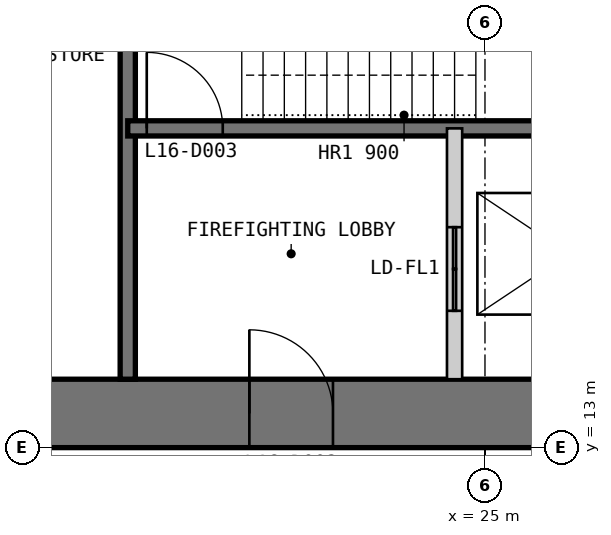
"""IFC4 building model, lengths in metres.
Left out: names, types, materials, properties, quantities, classifications, styles, units other than length and angle.
Written with IfcOpenShell. Run it as: python <this file> out.ifc"""

import sys

from ifc_helpers import new_model, si_unit, direction, frame, frame_2d, origin, place, context, subcontext, project, spatial, polyline, rectangle, outline, extrude, element, fill, save


model = new_model("IFC4")
c1 = context("Model", 3, precision=1e-05, world=origin(), true_north=direction((0.0, 1.0)))
c2 = subcontext(c1, "Body", "Model", "MODEL_VIEW")
j1 = project(units=[si_unit("LENGTHUNIT", "METRE"), si_unit("PLANEANGLEUNIT", "RADIAN")], contexts=[c1])
p1 = place(None, origin())
s1 = spatial("IfcSite", under=j1, at=p1, CompositionType="ELEMENT")
p2 = place(p1, origin())
s2 = spatial("IfcBuilding", under=s1, at=p2, CompositionType="ELEMENT")
p3 = place(p2, frame((0.0, 0.0, 71.0)))
s3 = spatial("IfcBuildingStorey", under=s2, at=p3, CompositionType="ELEMENT", Elevation=71.0)
p4 = place(p3, frame((13.0, 13.45, 0.0), z_axis=(0.0, 0.0, 1.0), x_axis=(1.0, 0.0, 0.0)))
e1 = element("IfcWall", 1, at=p4, inside=s3, PredefinedType="SHEAR", context=c2, shape_type="SweptSolid", body=[
    extrude(outline(polyline([(0.0, -0.45), (24.0, -0.45), (23.1, 0.45), (0.9, 0.45), (0.0, -0.45)])), origin(), (0.0, 0.0, 1.0), 4.0),
])
p5 = place(p4, frame((4.9, 0.0, 0.0)))
e2 = element("IfcOpeningElement", 2, at=p5, cuts=e1, PredefinedType="OPENING", context=c2, shape_type="SweptSolid", body=[
    extrude(rectangle(XDim=1.0, YDim=2.2, at=frame_2d((0.5, 1.1))), frame((0.0, 0.46, 0.0), z_axis=(0.0, -1.0, 0.0), x_axis=(1.0, 0.0, 0.0)), (0.0, 0.0, 1.0), 0.92),
])
p6 = place(p4, frame((8.9, 0.0, 0.0)))
e3 = element("IfcOpeningElement", 3, at=p6, cuts=e1, PredefinedType="OPENING", context=c2, shape_type="SweptSolid", body=[
    extrude(rectangle(XDim=1.1, YDim=2.2, at=frame_2d((0.55, 1.1))), frame((0.0, 0.46, 0.0), z_axis=(0.0, -1.0, 0.0), x_axis=(1.0, 0.0, 0.0)), (0.0, 0.0, 1.0), 0.92),
])
p7 = place(p4, frame((15.05, 0.0, 0.0)))
e4 = element("IfcOpeningElement", 4, at=p7, cuts=e1, PredefinedType="OPENING", context=c2, shape_type="SweptSolid", body=[
    extrude(rectangle(XDim=0.9, YDim=2.2, at=frame_2d((0.45, 1.1))), frame((0.0, 0.46, 0.0), z_axis=(0.0, -1.0, 0.0), x_axis=(1.0, 0.0, 0.0)), (0.0, 0.0, 1.0), 0.92),
])
p8 = place(p4, frame((17.9, 0.0, 0.0)))
e5 = element("IfcOpeningElement", 5, at=p8, cuts=e1, PredefinedType="OPENING", context=c2, shape_type="SweptSolid", body=[
    extrude(rectangle(XDim=1.0, YDim=2.2, at=frame_2d((0.5, 1.1))), frame((0.0, 0.46, 0.0), z_axis=(0.0, -1.0, 0.0), x_axis=(1.0, 0.0, 0.0)), (0.0, 0.0, 1.0), 0.92),
])
p9 = place(p4, frame((21.4, 0.0, 0.0)))
e6 = element("IfcOpeningElement", 6, at=p9, cuts=e1, PredefinedType="OPENING", context=c2, shape_type="SweptSolid", body=[
    extrude(rectangle(XDim=1.0, YDim=2.2, at=frame_2d((0.5, 1.1))), frame((0.0, 0.46, 0.0), z_axis=(0.0, -1.0, 0.0), x_axis=(1.0, 0.0, 0.0)), (0.0, 0.0, 1.0), 0.92),
])
p10 = place(p3, frame((20.3, 13.9, 0.0), z_axis=(0.0, 0.0, 1.0), x_axis=(0.0, 1.0, 0.0)))
e7 = element("IfcWall", 7, at=p10, inside=s3, PredefinedType="SOLIDWALL", context=c2, shape_type="SweptSolid", body=[
    extrude(rectangle(XDim=16.1, YDim=0.2, at=frame_2d((8.05, 0.0))), origin(), (0.0, 0.0, 1.0), 3.8),
])
p11 = place(p3, frame((20.3, 17.2, 0.0), z_axis=(0.0, 0.0, 1.0), x_axis=(1.0, 0.0, 0.0)))
e8 = element("IfcWall", 8, at=p11, inside=s3, PredefinedType="SOLIDWALL", context=c2, shape_type="SweptSolid", body=[
    extrude(rectangle(XDim=9.4, YDim=0.2, at=frame_2d((4.7, 0.0))), origin(), (0.0, 0.0, 1.0), 3.8),
])
p12 = place(p11, frame((0.25, 0.0, 0.0)))
e9 = element("IfcOpeningElement", 9, at=p12, cuts=e8, PredefinedType="OPENING", context=c2, shape_type="SweptSolid", body=[
    extrude(rectangle(XDim=1.0, YDim=2.2, at=frame_2d((0.5, 1.1))), frame((0.0, 0.11, 0.0), z_axis=(0.0, -1.0, 0.0), x_axis=(1.0, 0.0, 0.0)), (0.0, 0.0, 1.0), 0.22),
])
p13 = place(p3, frame((24.6, 13.9, 0.0), z_axis=(0.0, 0.0, 1.0), x_axis=(0.0, 1.0, 0.0)))
e10 = element("IfcWall", 10, at=p13, inside=s3, PredefinedType="PARTITIONING", context=c2, shape_type="SweptSolid", body=[
    extrude(rectangle(XDim=3.3, YDim=0.2, at=frame_2d((1.65, 0.0))), origin(), (0.0, 0.0, 1.0), 3.8),
])
p14 = place(p13, frame((0.9, 0.0, 0.0)))
e11 = element("IfcOpeningElement", 11, at=p14, cuts=e10, PredefinedType="OPENING", context=c2, shape_type="SweptSolid", body=[
    extrude(rectangle(XDim=1.1, YDim=2.2, at=frame_2d((0.55, 1.1))), frame((0.0, 0.11, 0.0), z_axis=(0.0, -1.0, 0.0), x_axis=(1.0, 0.0, 0.0)), (0.0, 0.0, 1.0), 0.22),
])
p15 = place(p6, origin())
e12 = element("IfcDoor", 12, at=p15, inside=s3, OperationType="SINGLE_SWING_LEFT", PredefinedType="DOOR", context=c2, shape_type="SweptSolid", body=[
    extrude(rectangle(XDim=1.1, YDim=2.2, at=frame_2d((0.55, 1.1))), frame((0.0, 0.025, 0.0), z_axis=(0.0, -1.0, 0.0), x_axis=(1.0, 0.0, 0.0)), (0.0, 0.0, 1.0), 0.05),
    extrude(outline(polyline([(0.0, 0.0), (0.04, 0.0), (0.04, 2.16), (1.06, 2.16), (1.06, 0.0), (1.1, 0.0), (1.1, 2.2), (0.0, 2.2), (0.0, 0.0)])), frame((0.0, 0.3, 0.0), z_axis=(0.0, -1.0, 0.0), x_axis=(1.0, 0.0, 0.0)), (0.0, 0.0, 1.0), 0.6),
])
fill(e3, e12)
p16 = place(p12, origin())
e13 = element("IfcDoor", 13, at=p16, inside=s3, OperationType="SINGLE_SWING_LEFT", PredefinedType="DOOR", context=c2, shape_type="SweptSolid", body=[
    extrude(rectangle(XDim=1.0, YDim=2.2, at=frame_2d((0.5, 1.1))), frame((0.0, 0.025, 0.0), z_axis=(0.0, -1.0, 0.0), x_axis=(1.0, 0.0, 0.0)), (0.0, 0.0, 1.0), 0.05),
])
fill(e9, e13)
p17 = place(p14, origin())
e14 = element("IfcDoor", 14, at=p17, inside=s3, OperationType="DOUBLE_DOOR_SLIDING", PredefinedType="DOOR", context=c2, shape_type="SweptSolid", body=[
    extrude(rectangle(XDim=1.1, YDim=2.2, at=frame_2d((0.55, 1.1))), frame((0.0, 0.025, 0.0), z_axis=(0.0, -1.0, 0.0), x_axis=(1.0, 0.0, 0.0)), (0.0, 0.0, 1.0), 0.05),
])
fill(e11, e14)
save(model, sys.argv[1])
